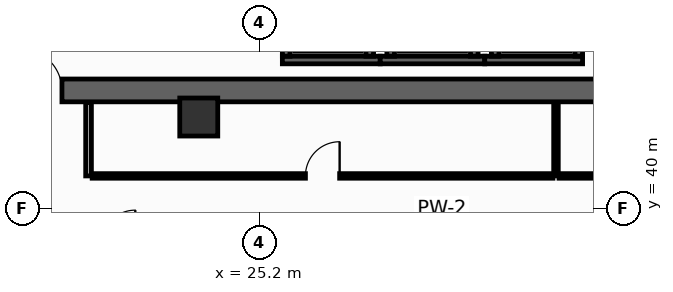
"""IFC4 building model, lengths in metres.
Left out: names, types, materials, properties, quantities, classifications, styles, units other than length and angle.
Written with IfcOpenShell. Run it as: python <this file> out.ifc"""

import sys

from ifc_helpers import new_model, si_unit, direction, frame, frame_2d, origin, origin_2d, place, context, subcontext, project, spatial, rectangle, hollow_rectangle, extrude, element, fill, save


model = new_model("IFC4")
c1 = context("Model", 3, precision=1e-05, world=origin(), true_north=direction((0.0, 1.0)))
c2 = subcontext(c1, "Body", "Model", "MODEL_VIEW")
j1 = project(units=[si_unit("LENGTHUNIT", "METRE"), si_unit("PLANEANGLEUNIT", "RADIAN")], contexts=[c1])
p1 = place(None, origin())
s1 = spatial("IfcSite", under=j1, at=p1, CompositionType="ELEMENT")
p2 = place(p1, origin())
s2 = spatial("IfcBuilding", under=s1, at=p2, CompositionType="ELEMENT")
p3 = place(p2, frame((0.0, 0.0, 119.2)))
s3 = spatial("IfcBuildingStorey", under=s2, at=p3, CompositionType="ELEMENT", Elevation=119.2)
p4 = place(p3, frame((13.5, 43.1, 0.0), z_axis=(0.0, 0.0, 1.0), x_axis=(1.0, 0.0, 0.0)))
e1 = element("IfcWall", 1, at=p4, inside=s3, PredefinedType="SHEAR", context=c2, shape_type="SweptSolid", body=[
    extrude(rectangle(XDim=32.9, YDim=0.6, at=frame_2d((16.45, 0.0))), origin(), (0.0, 0.0, 1.0), 3.95),
])
p5 = place(p4, frame((5.4, 0.0, 0.0)))
e2 = element("IfcOpeningElement", 2, at=p5, cuts=e1, PredefinedType="OPENING", context=c2, shape_type="SweptSolid", body=[
    extrude(rectangle(XDim=1.1, YDim=2.15, at=frame_2d((0.55, 1.075))), frame((0.0, 0.31, 0.0), z_axis=(0.0, -1.0, 0.0), x_axis=(1.0, 0.0, 0.0)), (0.0, 0.0, 1.0), 0.62),
])
p6 = place(p4, frame((25.6, 0.0, 0.0)))
e3 = element("IfcOpeningElement", 3, at=p6, cuts=e1, PredefinedType="OPENING", context=c2, shape_type="SweptSolid", body=[
    extrude(rectangle(XDim=1.1, YDim=2.15, at=frame_2d((0.55, 1.075))), frame((0.0, 0.31, 0.0), z_axis=(0.0, -1.0, 0.0), x_axis=(1.0, 0.0, 0.0)), (0.0, 0.0, 1.0), 0.62),
])
p7 = place(p3, frame((23.6, 42.4, 0.0), z_axis=(0.0, 0.0, 1.0), x_axis=(1.0, 0.0, 0.0)))
e4 = element("IfcColumn", 4, at=p7, inside=s3, PredefinedType="COLUMN", context=c2, shape_type="SweptSolid", body=[
    extrude(hollow_rectangle(XDim=1.0, YDim=1.0, WallThickness=0.045, at=origin_2d()), origin(), (0.0, 0.0, 1.0), 4.4),
])
p8 = place(p3, frame((25.8, 43.9, 0.0), z_axis=(0.0, 0.0, 1.0), x_axis=(1.0, 0.0, 0.0)))
e5 = element("IfcWall", 5, at=p8, inside=s3, PredefinedType="SHEAR", context=c2, shape_type="SweptSolid", body=[
    extrude(rectangle(XDim=2.575, YDim=0.2, at=frame_2d((1.288, 0.0))), origin(), (0.0, 0.0, 1.0), 3.95),
])
for number, where, z_axis, x_axis in (
    (6, (25.9, 44.0, 0.0), (0.0, 0.0, 1.0), (0.0, 1.0, 0.0)),
    (7, (28.1, 44.0, 0.0), (0.0, 0.0, 1.0), (0.0, 1.0, 0.0)),
):
    element("IfcWall", number, at=place(p3, frame(where, z_axis=z_axis, x_axis=x_axis)), inside=s3, PredefinedType="SHEAR", context=c2, shape_type="SweptSolid", body=[
        extrude(rectangle(XDim=2.3, YDim=0.2, at=frame_2d((1.15, 0.0))), origin(), (0.0, 0.0, 1.0), 3.95),
    ])
p9 = place(p3, frame((28.375, 43.9, 0.0), z_axis=(0.0, 0.0, 1.0), x_axis=(1.0, 0.0, 0.0)))
e8 = element("IfcWall", 8, at=p9, inside=s3, PredefinedType="SHEAR", context=c2, shape_type="SweptSolid", body=[
    extrude(rectangle(XDim=2.75, YDim=0.2, at=frame_2d((1.375, 0.0))), origin(), (0.0, 0.0, 1.0), 3.95),
])
for number, where, z_axis, x_axis in (
    (9, (28.65, 44.0, 0.0), (0.0, 0.0, 1.0), (0.0, 1.0, 0.0)),
    (10, (30.85, 44.0, 0.0), (0.0, 0.0, 1.0), (0.0, 1.0, 0.0)),
):
    element("IfcWall", number, at=place(p3, frame(where, z_axis=z_axis, x_axis=x_axis)), inside=s3, PredefinedType="SHEAR", context=c2, shape_type="SweptSolid", body=[
        extrude(rectangle(XDim=2.3, YDim=0.2, at=frame_2d((1.15, 0.0))), origin(), (0.0, 0.0, 1.0), 3.95),
    ])
p10 = place(p3, frame((31.125, 43.9, 0.0), z_axis=(0.0, 0.0, 1.0), x_axis=(1.0, 0.0, 0.0)))
e11 = element("IfcWall", 11, at=p10, inside=s3, PredefinedType="SHEAR", context=c2, shape_type="SweptSolid", body=[
    extrude(rectangle(XDim=2.575, YDim=0.2, at=frame_2d((1.288, 0.0))), origin(), (0.0, 0.0, 1.0), 3.95),
])
for number, where, z_axis, x_axis in (
    (12, (31.4, 44.0, 0.0), (0.0, 0.0, 1.0), (0.0, 1.0, 0.0)),
    (13, (33.6, 44.0, 0.0), (0.0, 0.0, 1.0), (0.0, 1.0, 0.0)),
):
    element("IfcWall", number, at=place(p3, frame(where, z_axis=z_axis, x_axis=x_axis)), inside=s3, PredefinedType="SHEAR", context=c2, shape_type="SweptSolid", body=[
        extrude(rectangle(XDim=2.3, YDim=0.2, at=frame_2d((1.15, 0.0))), origin(), (0.0, 0.0, 1.0), 3.95),
    ])
p11 = place(p3, frame((20.7, 40.85, 0.0), z_axis=(0.0, 0.0, 1.0), x_axis=(0.0, 1.0, 0.0)))
e14 = element("IfcWall", 14, at=p11, inside=s3, PredefinedType="PARTITIONING", context=c2, shape_type="SweptSolid", body=[
    extrude(rectangle(XDim=1.93, YDim=0.15, at=frame_2d((0.965, 0.0))), origin(), (0.0, 0.0, 1.0), 3.95),
])
p12 = place(p3, frame((33.0, 40.85, 0.0), z_axis=(0.0, 0.0, 1.0), x_axis=(0.0, 1.0, 0.0)))
e15 = element("IfcWall", 15, at=p12, inside=s3, PredefinedType="PARTITIONING", context=c2, shape_type="SweptSolid", body=[
    extrude(rectangle(XDim=1.93, YDim=0.12, at=frame_2d((0.965, 0.0))), origin(), (0.0, 0.0, 1.0), 3.135),
])
p13 = place(p3, frame((20.795, 40.85, 0.0), z_axis=(0.0, 0.0, 1.0), x_axis=(1.0, 0.0, 0.0)))
e16 = element("IfcWall", 16, at=p13, inside=s3, PredefinedType="PARTITIONING", context=c2, shape_type="SweptSolid", body=[
    extrude(rectangle(XDim=12.125, YDim=0.12, at=frame_2d((6.062, 0.0))), origin(), (0.0, 0.0, 1.0), 3.135),
])
p14 = place(p13, frame((5.612, 0.0, 0.0)))
e17 = element("IfcOpeningElement", 17, at=p14, cuts=e16, PredefinedType="OPENING", context=c2, shape_type="SweptSolid", body=[
    extrude(rectangle(XDim=0.9, YDim=2.1, at=frame_2d((0.45, 1.05))), frame((0.0, 0.07, 0.0), z_axis=(0.0, -1.0, 0.0), x_axis=(1.0, 0.0, 0.0)), (0.0, 0.0, 1.0), 0.14),
])
p15 = place(p3, frame((33.08, 40.85, 0.0), z_axis=(0.0, 0.0, 1.0), x_axis=(1.0, 0.0, 0.0)))
e18 = element("IfcWall", 18, at=p15, inside=s3, PredefinedType="PARTITIONING", context=c2, shape_type="SweptSolid", body=[
    extrude(rectangle(XDim=5.625, YDim=0.12, at=frame_2d((2.812, 0.0))), origin(), (0.0, 0.0, 1.0), 3.135),
])
p16 = place(p15, frame((1.702, 0.0, 0.0)))
e19 = element("IfcOpeningElement", 19, at=p16, cuts=e18, PredefinedType="OPENING", context=c2, shape_type="SweptSolid", body=[
    extrude(rectangle(XDim=0.9, YDim=2.1, at=frame_2d((0.45, 1.05))), frame((0.0, 0.07, 0.0), z_axis=(0.0, -1.0, 0.0), x_axis=(1.0, 0.0, 0.0)), (0.0, 0.0, 1.0), 0.14),
])
p17 = place(p5, origin())
e20 = element("IfcDoor", 20, at=p17, inside=s3, OperationType="SINGLE_SWING_LEFT", PredefinedType="DOOR", context=c2, shape_type="SweptSolid", body=[
    extrude(rectangle(XDim=1.1, YDim=2.15, at=frame_2d((0.55, 1.075))), frame((0.0, 0.025, 0.0), z_axis=(0.0, -1.0, 0.0), x_axis=(1.0, 0.0, 0.0)), (0.0, 0.0, 1.0), 0.05),
])
fill(e2, e20)
p18 = place(p14, origin())
e21 = element("IfcDoor", 21, at=p18, inside=s3, OperationType="SINGLE_SWING_RIGHT", PredefinedType="DOOR", context=c2, shape_type="SweptSolid", body=[
    extrude(rectangle(XDim=0.9, YDim=2.1, at=frame_2d((0.45, 1.05))), frame((0.0, 0.025, 0.0), z_axis=(0.0, -1.0, 0.0), x_axis=(1.0, 0.0, 0.0)), (0.0, 0.0, 1.0), 0.05),
])
fill(e17, e21)
save(model, sys.argv[1])
